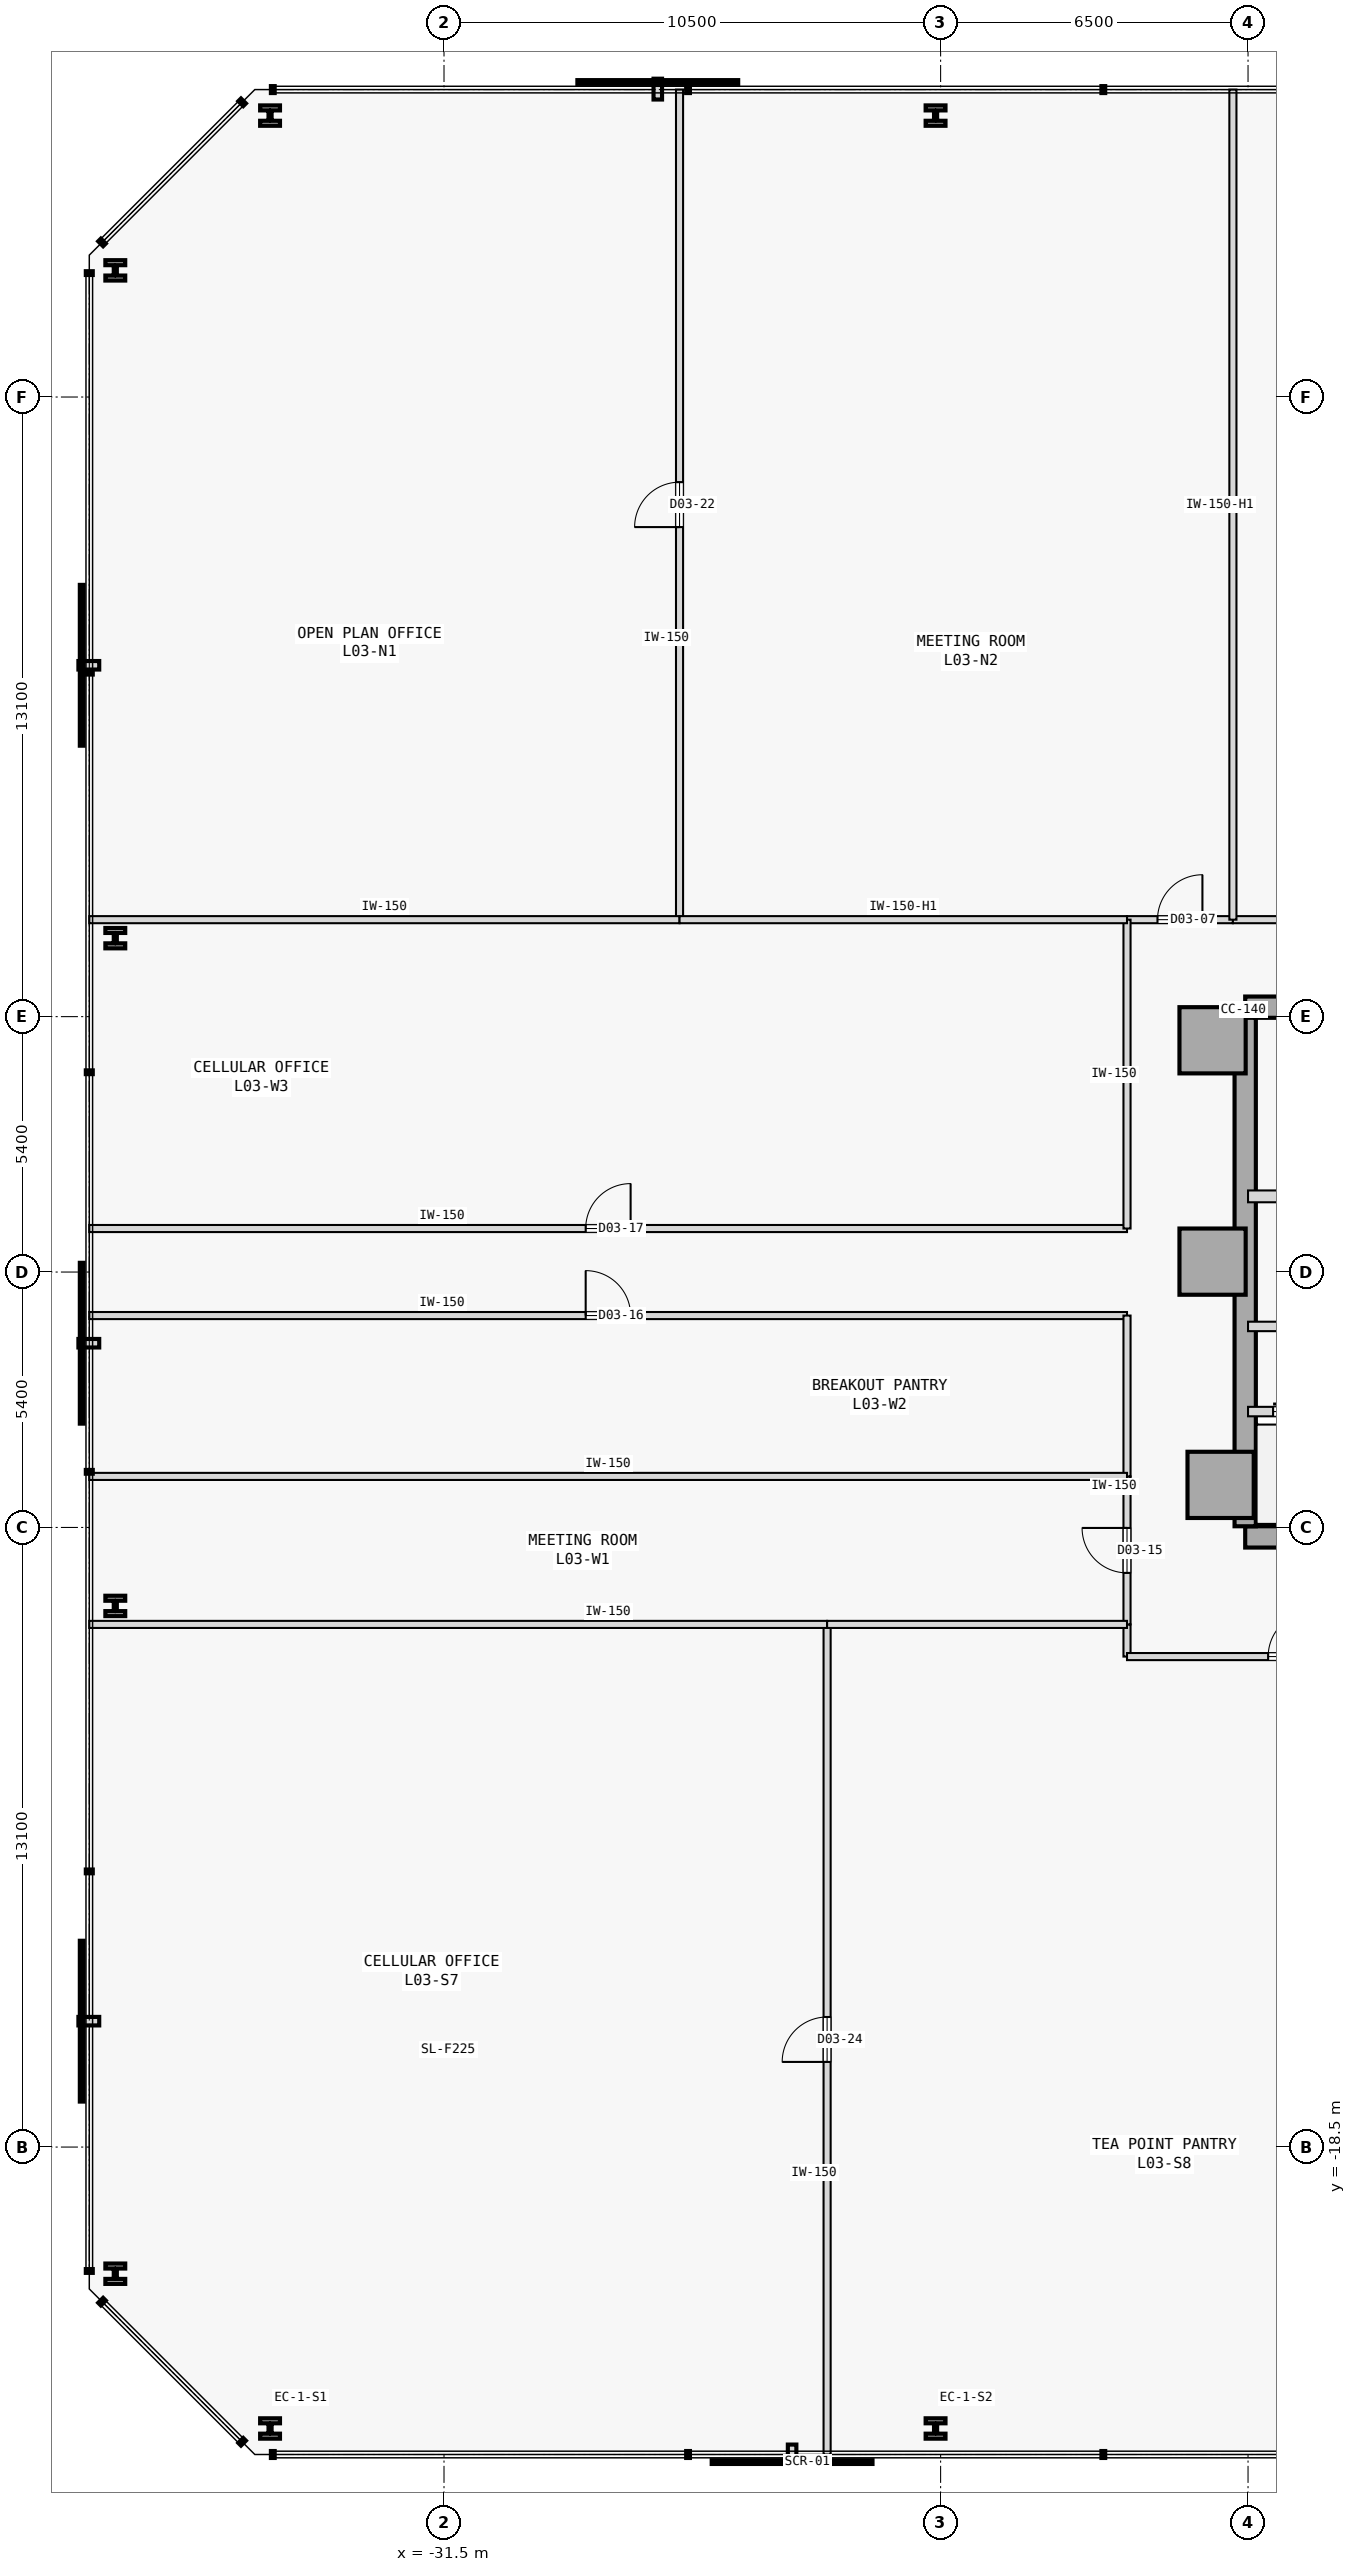
"""IFC4 building model, lengths in metres.
Left out: names, types, materials, properties, quantities, classifications, styles, units other than length and angle.
Written with IfcOpenShell. Run it as: python <this file> out.ifc"""

import sys

from ifc_helpers import new_model, si_unit, direction, frame, frame_2d, origin, origin_2d, place, context, subcontext, project, spatial, rectangle, i_section, extrude, element, fill, save


model = new_model("IFC4")
c1 = context("Model", 3, precision=1e-05, world=origin(), true_north=direction((0.0, 1.0)))
c2 = subcontext(c1, "Body", "Model", "MODEL_VIEW")
j1 = project(units=[si_unit("LENGTHUNIT", "METRE"), si_unit("PLANEANGLEUNIT", "RADIAN")], contexts=[c1])
p1 = place(None, origin())
s1 = spatial("IfcSite", under=j1, at=p1, CompositionType="ELEMENT")
p2 = place(p1, origin())
s2 = spatial("IfcBuilding", under=s1, at=p2, CompositionType="ELEMENT")
p3 = place(p2, frame((0.0, 0.0, 18.0)))
s3 = spatial("IfcBuildingStorey", under=s2, at=p3, CompositionType="ELEMENT", Elevation=18.0)
for number, where, z_axis, x_axis in (
    (1, (-15.25, 4.9, 0.0), (0.0, 0.0, 1.0), (1.0, 0.0, 0.0)),
    (2, (-15.25, 0.22, 0.0), (0.0, 0.0, 1.0), (1.0, 0.0, 0.0)),
    (3, (-15.08, -4.5, 0.0), (0.0, 0.0, 1.0), (1.0, 0.0, 0.0)),
):
    element("IfcColumn", number, at=place(p3, frame(where, z_axis=z_axis, x_axis=x_axis)), inside=s3, PredefinedType="COLUMN", context=c2, shape_type="SweptSolid", body=[
        extrude(rectangle(XDim=1.4, YDim=1.4, at=origin_2d()), origin(), (0.0, 0.0, 1.0), 3.8),
    ])
p4 = place(p3, frame((-14.56, 5.6, 0.0), z_axis=(0.0, 0.0, 1.0), x_axis=(1.0, 0.0, 0.0)))
e4 = element("IfcWall", 4, at=p4, inside=s3, PredefinedType="SHEAR", context=c2, shape_type="SweptSolid", body=[
    extrude(rectangle(XDim=11.41, YDim=0.45, at=frame_2d((5.705, 0.0))), origin(), (0.0, 0.0, 1.0), 3.575),
])
p5 = place(p3, frame((-14.56, -5.6, 0.0), z_axis=(0.0, 0.0, 1.0), x_axis=(1.0, 0.0, 0.0)))
e5 = element("IfcWall", 5, at=p5, inside=s3, PredefinedType="SHEAR", context=c2, shape_type="SweptSolid", body=[
    extrude(rectangle(XDim=10.86, YDim=0.45, at=frame_2d((5.43, 0.0))), origin(), (0.0, 0.0, 1.0), 3.575),
])
p6 = place(p3, frame((-14.56, -5.375, 0.0), z_axis=(0.0, 0.0, 1.0), x_axis=(0.0, 1.0, 0.0)))
e6 = element("IfcWall", 6, at=p6, inside=s3, PredefinedType="SHEAR", context=c2, shape_type="SweptSolid", body=[
    extrude(rectangle(XDim=10.75, YDim=0.45, at=frame_2d((5.375, 0.0))), origin(), (0.0, 0.0, 1.0), 3.575),
])
for number, where, z_axis, x_axis in (
    (7, (-35.178, -24.45, 0.0), (0.0, 0.0, 1.0), (1.0, 0.0, 0.0)),
    (8, (-21.107, -24.45, 0.0), (0.0, 0.0, 1.0), (1.0, 0.0, 0.0)),
    (9, (-21.107, 24.45, 0.0), (0.0, 0.0, 1.0), (1.0, 0.0, 0.0)),
    (10, (-35.178, 24.45, 0.0), (0.0, 0.0, 1.0), (1.0, 0.0, 0.0)),
    (11, (-38.45, 21.178, 0.0), (0.0, 0.0, 1.0), (1.0, 0.0, 0.0)),
    (12, (-38.45, 7.059, 0.0), (0.0, 0.0, 1.0), (1.0, 0.0, 0.0)),
    (13, (-38.45, -7.059, 0.0), (0.0, 0.0, 1.0), (1.0, 0.0, 0.0)),
    (14, (-38.45, -21.178, 0.0), (0.0, 0.0, 1.0), (1.0, 0.0, 0.0)),
):
    element("IfcColumn", number, at=place(p3, frame(where, z_axis=z_axis, x_axis=x_axis)), inside=s3, PredefinedType="COLUMN", context=c2, shape_type="SweptSolid", body=[
        extrude(i_section(OverallWidth=0.42, OverallDepth=0.431, WebThickness=0.065, FlangeThickness=0.106, FilletRadius=0.015, at=origin_2d()), origin(), (0.0, 0.0, 1.0), 3.8),
    ])
p7 = place(p3, frame((-14.5, 1.6, 0.0), z_axis=(0.0, 0.0, 1.0), x_axis=(1.0, 0.0, 0.0)))
e15 = element("IfcWall", 15, at=p7, inside=s3, PredefinedType="STANDARD", context=c2, shape_type="SweptSolid", body=[
    extrude(rectangle(XDim=3.6, YDim=0.25, at=frame_2d((1.8, 0.0))), origin(), (0.0, 0.0, 1.0), 3.575),
])
p8 = place(p7, frame((0.92, 0.0, 0.0)))
e16 = element("IfcOpeningElement", 16, at=p8, cuts=e15, PredefinedType="OPENING", context=c2, shape_type="SweptSolid", body=[
    extrude(rectangle(XDim=1.05, YDim=2.15, at=frame_2d((0.525, 1.075))), frame((0.0, 0.135, 0.0), z_axis=(0.0, -1.0, 0.0), x_axis=(1.0, 0.0, 0.0)), (0.0, 0.0, 1.0), 0.27),
])
p9 = place(p3, frame((-14.5, -1.15, 0.0), z_axis=(0.0, 0.0, 1.0), x_axis=(1.0, 0.0, 0.0)))
e17 = element("IfcWall", 17, at=p9, inside=s3, PredefinedType="STANDARD", context=c2, shape_type="SweptSolid", body=[
    extrude(rectangle(XDim=2.95, YDim=0.2, at=frame_2d((1.475, 0.0))), origin(), (0.0, 0.0, 1.0), 3.575),
])
p10 = place(p9, frame((0.75, 0.0, 0.0)))
e18 = element("IfcOpeningElement", 18, at=p10, cuts=e17, PredefinedType="OPENING", context=c2, shape_type="SweptSolid", body=[
    extrude(rectangle(XDim=1.05, YDim=2.18, at=frame_2d((0.525, 1.09))), frame((0.0, 0.11, 0.0), z_axis=(0.0, -1.0, 0.0), x_axis=(1.0, 0.0, 0.0)), (0.0, 0.0, 1.0), 0.22),
])
p11 = place(p3, frame((-14.5, -2.95, 0.0), z_axis=(0.0, 0.0, 1.0), x_axis=(1.0, 0.0, 0.0)))
e19 = element("IfcWall", 19, at=p11, inside=s3, PredefinedType="STANDARD", context=c2, shape_type="SweptSolid", body=[
    extrude(rectangle(XDim=10.8, YDim=0.2, at=frame_2d((5.4, 0.0))), origin(), (0.0, 0.0, 1.0), 3.575),
])
p12 = place(p11, frame((0.53, 0.0, 0.0)))
e20 = element("IfcOpeningElement", 20, at=p12, cuts=e19, PredefinedType="OPENING", context=c2, shape_type="SweptSolid", body=[
    extrude(rectangle(XDim=1.1, YDim=2.15, at=frame_2d((0.55, 1.075))), frame((0.0, 0.11, 0.0), z_axis=(0.0, -1.0, 0.0), x_axis=(1.0, 0.0, 0.0)), (0.0, 0.0, 1.0), 0.22),
])
p13 = place(p11, frame((2.69, 0.0, 0.0)))
e21 = element("IfcOpeningElement", 21, at=p13, cuts=e19, PredefinedType="OPENING", context=c2, shape_type="SweptSolid", body=[
    extrude(rectangle(XDim=1.1, YDim=2.15, at=frame_2d((0.55, 1.075))), frame((0.0, 0.11, 0.0), z_axis=(0.0, -1.0, 0.0), x_axis=(1.0, 0.0, 0.0)), (0.0, 0.0, 1.0), 0.22),
])
p14 = place(p3, frame((-17.059, 7.45, 0.0), z_axis=(0.0, 0.0, 1.0), x_axis=(1.0, 0.0, 0.0)))
e22 = element("IfcWall", 22, at=p14, inside=s3, PredefinedType="PARTITIONING", context=c2, shape_type="SweptSolid", body=[
    extrude(rectangle(XDim=2.239, YDim=0.15, at=frame_2d((1.12, 0.0))), origin(), (0.0, 0.0, 1.0), 3.575),
])
p15 = place(p14, frame((0.645, 0.0, 0.0)))
e23 = element("IfcOpeningElement", 23, at=p15, cuts=e22, PredefinedType="OPENING", context=c2, shape_type="SweptSolid", body=[
    extrude(rectangle(XDim=0.95, YDim=2.15, at=frame_2d((0.475, 1.075))), frame((0.0, 0.085, 0.0), z_axis=(0.0, -1.0, 0.0), x_axis=(1.0, 0.0, 0.0)), (0.0, 0.0, 1.0), 0.17),
])
p16 = place(p3, frame((-14.82, 7.45, 0.0), z_axis=(0.0, 0.0, 1.0), x_axis=(1.0, 0.0, 0.0)))
e24 = element("IfcWall", 24, at=p16, inside=s3, PredefinedType="PARTITIONING", context=c2, shape_type="SweptSolid", body=[
    extrude(rectangle(XDim=13.9, YDim=0.15, at=frame_2d((6.95, 0.0))), origin(), (0.0, 0.0, 1.0), 3.575),
])
p17 = place(p3, frame((-17.059, -8.13, 0.0), z_axis=(0.0, 0.0, 1.0), x_axis=(0.0, 1.0, 0.0)))
e25 = element("IfcWall", 25, at=p17, inside=s3, PredefinedType="PARTITIONING", context=c2, shape_type="SweptSolid", body=[
    extrude(rectangle(XDim=0.68, YDim=0.15, at=frame_2d((0.34, 0.0))), origin(), (0.0, 0.0, 1.0), 3.575),
])
p18 = place(p3, frame((-17.059, -8.13, 0.0), z_axis=(0.0, 0.0, 1.0), x_axis=(1.0, 0.0, 0.0)))
e26 = element("IfcWall", 26, at=p18, inside=s3, PredefinedType="PARTITIONING", context=c2, shape_type="SweptSolid", body=[
    extrude(rectangle(XDim=6.919, YDim=0.15, at=frame_2d((3.459, 0.0))), origin(), (0.0, 0.0, 1.0), 3.575),
])
p19 = place(p18, frame((2.985, 0.0, 0.0)))
e27 = element("IfcOpeningElement", 27, at=p19, cuts=e26, PredefinedType="OPENING", context=c2, shape_type="SweptSolid", body=[
    extrude(rectangle(XDim=0.95, YDim=2.15, at=frame_2d((0.475, 1.075))), frame((0.0, 0.085, 0.0), z_axis=(0.0, -1.0, 0.0), x_axis=(1.0, 0.0, 0.0)), (0.0, 0.0, 1.0), 0.17),
])
p20 = place(p3, frame((-17.059, -7.45, 0.0), z_axis=(0.0, 0.0, 1.0), x_axis=(0.0, 1.0, 0.0)))
e28 = element("IfcWall", 28, at=p20, inside=s3, PredefinedType="PARTITIONING", context=c2, shape_type="SweptSolid", body=[
    extrude(rectangle(XDim=3.129, YDim=0.15, at=frame_2d((1.564, 0.0))), origin(), (0.0, 0.0, 1.0), 3.575),
])
p21 = place(p20, frame((1.09, 0.0, 0.0)))
e29 = element("IfcOpeningElement", 29, at=p21, cuts=e28, PredefinedType="OPENING", context=c2, shape_type="SweptSolid", body=[
    extrude(rectangle(XDim=0.95, YDim=2.15, at=frame_2d((0.475, 1.075))), frame((0.0, 0.085, 0.0), z_axis=(0.0, -1.0, 0.0), x_axis=(1.0, 0.0, 0.0)), (0.0, 0.0, 1.0), 0.17),
])
p22 = place(p3, frame((-39.0, -0.92, 0.0), z_axis=(0.0, 0.0, 1.0), x_axis=(1.0, 0.0, 0.0)))
e30 = element("IfcWall", 30, at=p22, inside=s3, PredefinedType="PARTITIONING", context=c2, shape_type="SweptSolid", body=[
    extrude(rectangle(XDim=21.941, YDim=0.15, at=frame_2d((10.97, 0.0))), origin(), (0.0, 0.0, 1.0), 3.575),
])
p23 = place(p22, frame((10.496, 0.0, 0.0)))
e31 = element("IfcOpeningElement", 31, at=p23, cuts=e30, PredefinedType="OPENING", context=c2, shape_type="SweptSolid", body=[
    extrude(rectangle(XDim=0.95, YDim=2.15, at=frame_2d((0.475, 1.075))), frame((0.0, 0.085, 0.0), z_axis=(0.0, -1.0, 0.0), x_axis=(1.0, 0.0, 0.0)), (0.0, 0.0, 1.0), 0.17),
])
p24 = place(p3, frame((-17.059, -4.321, 0.0), z_axis=(0.0, 0.0, 1.0), x_axis=(0.0, 1.0, 0.0)))
e32 = element("IfcWall", 32, at=p24, inside=s3, PredefinedType="PARTITIONING", context=c2, shape_type="SweptSolid", body=[
    extrude(rectangle(XDim=3.401, YDim=0.15, at=frame_2d((1.701, 0.0))), origin(), (0.0, 0.0, 1.0), 3.575),
])
p25 = place(p3, frame((-39.0, 0.92, 0.0), z_axis=(0.0, 0.0, 1.0), x_axis=(1.0, 0.0, 0.0)))
e33 = element("IfcWall", 33, at=p25, inside=s3, PredefinedType="PARTITIONING", context=c2, shape_type="SweptSolid", body=[
    extrude(rectangle(XDim=21.941, YDim=0.15, at=frame_2d((10.97, 0.0))), origin(), (0.0, 0.0, 1.0), 3.575),
])
p26 = place(p25, frame((10.496, 0.0, 0.0)))
e34 = element("IfcOpeningElement", 34, at=p26, cuts=e33, PredefinedType="OPENING", context=c2, shape_type="SweptSolid", body=[
    extrude(rectangle(XDim=0.95, YDim=2.15, at=frame_2d((0.475, 1.075))), frame((0.0, 0.085, 0.0), z_axis=(0.0, -1.0, 0.0), x_axis=(1.0, 0.0, 0.0)), (0.0, 0.0, 1.0), 0.17),
])
p27 = place(p3, frame((-17.059, 0.92, 0.0), z_axis=(0.0, 0.0, 1.0), x_axis=(0.0, 1.0, 0.0)))
e35 = element("IfcWall", 35, at=p27, inside=s3, PredefinedType="PARTITIONING", context=c2, shape_type="SweptSolid", body=[
    extrude(rectangle(XDim=6.53, YDim=0.15, at=frame_2d((3.265, 0.0))), origin(), (0.0, 0.0, 1.0), 3.575),
])
p28 = place(p3, frame((-26.52, 7.45, 0.0), z_axis=(0.0, 0.0, 1.0), x_axis=(0.0, 1.0, 0.0)))
e36 = element("IfcWall", 36, at=p28, inside=s3, PredefinedType="PARTITIONING", context=c2, shape_type="SweptSolid", body=[
    extrude(rectangle(XDim=17.55, YDim=0.15, at=frame_2d((8.775, 0.0))), origin(), (0.0, 0.0, 1.0), 3.575),
])
p29 = place(p28, frame((8.3, 0.0, 0.0)))
e37 = element("IfcOpeningElement", 37, at=p29, cuts=e36, PredefinedType="OPENING", context=c2, shape_type="SweptSolid", body=[
    extrude(rectangle(XDim=0.95, YDim=2.15, at=frame_2d((0.475, 1.075))), frame((0.0, 0.085, 0.0), z_axis=(0.0, -1.0, 0.0), x_axis=(1.0, 0.0, 0.0)), (0.0, 0.0, 1.0), 0.17),
])
p30 = place(p3, frame((-39.0, 7.45, 0.0), z_axis=(0.0, 0.0, 1.0), x_axis=(1.0, 0.0, 0.0)))
e38 = element("IfcWall", 38, at=p30, inside=s3, PredefinedType="PARTITIONING", context=c2, shape_type="SweptSolid", body=[
    extrude(rectangle(XDim=12.48, YDim=0.15, at=frame_2d((6.24, 0.0))), origin(), (0.0, 0.0, 1.0), 3.575),
])
p31 = place(p3, frame((-14.82, 7.45, 0.0), z_axis=(0.0, 0.0, 1.0), x_axis=(0.0, 1.0, 0.0)))
e39 = element("IfcWall", 39, at=p31, inside=s3, PredefinedType="PARTITIONING", context=c2, shape_type="SweptSolid", body=[
    extrude(rectangle(XDim=17.55, YDim=0.15, at=frame_2d((8.775, 0.0))), origin(), (0.0, 0.0, 1.0), 3.125),
])
p32 = place(p3, frame((-26.52, 7.45, 0.0), z_axis=(0.0, 0.0, 1.0), x_axis=(1.0, 0.0, 0.0)))
e40 = element("IfcWall", 40, at=p32, inside=s3, PredefinedType="PARTITIONING", context=c2, shape_type="SweptSolid", body=[
    extrude(rectangle(XDim=9.461, YDim=0.15, at=frame_2d((4.73, 0.0))), origin(), (0.0, 0.0, 1.0), 3.125),
])
p33 = place(p3, frame((-23.4, -25.0, 0.0), z_axis=(0.0, 0.0, 1.0), x_axis=(0.0, 1.0, 0.0)))
e41 = element("IfcWall", 41, at=p33, inside=s3, PredefinedType="PARTITIONING", context=c2, shape_type="SweptSolid", body=[
    extrude(rectangle(XDim=17.55, YDim=0.15, at=frame_2d((8.775, 0.0))), origin(), (0.0, 0.0, 1.0), 3.575),
])
p34 = place(p33, frame((8.3, 0.0, 0.0)))
e42 = element("IfcOpeningElement", 42, at=p34, cuts=e41, PredefinedType="OPENING", context=c2, shape_type="SweptSolid", body=[
    extrude(rectangle(XDim=0.95, YDim=2.15, at=frame_2d((0.475, 1.075))), frame((0.0, 0.085, 0.0), z_axis=(0.0, -1.0, 0.0), x_axis=(1.0, 0.0, 0.0)), (0.0, 0.0, 1.0), 0.17),
])
p35 = place(p3, frame((-39.0, -7.45, 0.0), z_axis=(0.0, 0.0, 1.0), x_axis=(1.0, 0.0, 0.0)))
e43 = element("IfcWall", 43, at=p35, inside=s3, PredefinedType="PARTITIONING", context=c2, shape_type="SweptSolid", body=[
    extrude(rectangle(XDim=15.6, YDim=0.15, at=frame_2d((7.8, 0.0))), origin(), (0.0, 0.0, 1.0), 3.575),
])
p36 = place(p3, frame((-23.4, -7.45, 0.0), z_axis=(0.0, 0.0, 1.0), x_axis=(1.0, 0.0, 0.0)))
e44 = element("IfcWall", 44, at=p36, inside=s3, PredefinedType="PARTITIONING", context=c2, shape_type="SweptSolid", body=[
    extrude(rectangle(XDim=6.341, YDim=0.15, at=frame_2d((3.17, 0.0))), origin(), (0.0, 0.0, 1.0), 3.575),
])
p37 = place(p3, frame((-39.0, -4.321, 0.0), z_axis=(0.0, 0.0, 1.0), x_axis=(1.0, 0.0, 0.0)))
e45 = element("IfcWall", 45, at=p37, inside=s3, PredefinedType="PARTITIONING", context=c2, shape_type="SweptSolid", body=[
    extrude(rectangle(XDim=21.941, YDim=0.15, at=frame_2d((10.97, 0.0))), origin(), (0.0, 0.0, 1.0), 3.575),
])
p38 = place(p12, origin())
e46 = element("IfcDoor", 46, at=p38, inside=s3, OperationType="SLIDING_TO_RIGHT", PredefinedType="DOOR", context=c2, shape_type="SweptSolid", body=[
    extrude(rectangle(XDim=1.1, YDim=2.15, at=frame_2d((0.55, 1.075))), frame((0.0, 0.025, 0.0), z_axis=(0.0, -1.0, 0.0), x_axis=(1.0, 0.0, 0.0)), (0.0, 0.0, 1.0), 0.05),
])
fill(e20, e46)
p39 = place(p15, origin())
e47 = element("IfcDoor", 47, at=p39, inside=s3, OperationType="SINGLE_SWING_RIGHT", PredefinedType="DOOR", context=c2, shape_type="SweptSolid", body=[
    extrude(rectangle(XDim=0.95, YDim=2.15, at=frame_2d((0.475, 1.075))), frame((0.0, 0.025, 0.0), z_axis=(0.0, -1.0, 0.0), x_axis=(1.0, 0.0, 0.0)), (0.0, 0.0, 1.0), 0.05),
])
fill(e23, e47)
p40 = place(p19, origin())
e48 = element("IfcDoor", 48, at=p40, inside=s3, OperationType="SINGLE_SWING_RIGHT", PredefinedType="DOOR", context=c2, shape_type="SweptSolid", body=[
    extrude(rectangle(XDim=0.95, YDim=2.15, at=frame_2d((0.475, 1.075))), frame((0.0, 0.025, 0.0), z_axis=(0.0, -1.0, 0.0), x_axis=(1.0, 0.0, 0.0)), (0.0, 0.0, 1.0), 0.05),
])
fill(e27, e48)
p41 = place(p21, origin())
e49 = element("IfcDoor", 49, at=p41, inside=s3, OperationType="SINGLE_SWING_RIGHT", PredefinedType="DOOR", context=c2, shape_type="SweptSolid", body=[
    extrude(rectangle(XDim=0.95, YDim=2.15, at=frame_2d((0.475, 1.075))), frame((0.0, 0.025, 0.0), z_axis=(0.0, -1.0, 0.0), x_axis=(1.0, 0.0, 0.0)), (0.0, 0.0, 1.0), 0.05),
])
fill(e29, e49)
p42 = place(p23, origin())
e50 = element("IfcDoor", 50, at=p42, inside=s3, OperationType="SINGLE_SWING_LEFT", PredefinedType="DOOR", context=c2, shape_type="SweptSolid", body=[
    extrude(rectangle(XDim=0.95, YDim=2.15, at=frame_2d((0.475, 1.075))), frame((0.0, 0.025, 0.0), z_axis=(0.0, -1.0, 0.0), x_axis=(1.0, 0.0, 0.0)), (0.0, 0.0, 1.0), 0.05),
])
fill(e31, e50)
p43 = place(p26, origin())
e51 = element("IfcDoor", 51, at=p43, inside=s3, OperationType="SINGLE_SWING_RIGHT", PredefinedType="DOOR", context=c2, shape_type="SweptSolid", body=[
    extrude(rectangle(XDim=0.95, YDim=2.15, at=frame_2d((0.475, 1.075))), frame((0.0, 0.025, 0.0), z_axis=(0.0, -1.0, 0.0), x_axis=(1.0, 0.0, 0.0)), (0.0, 0.0, 1.0), 0.05),
])
fill(e34, e51)
p44 = place(p29, origin())
e52 = element("IfcDoor", 52, at=p44, inside=s3, OperationType="SINGLE_SWING_LEFT", PredefinedType="DOOR", context=c2, shape_type="SweptSolid", body=[
    extrude(rectangle(XDim=0.95, YDim=2.15, at=frame_2d((0.475, 1.075))), frame((0.0, 0.025, 0.0), z_axis=(0.0, -1.0, 0.0), x_axis=(1.0, 0.0, 0.0)), (0.0, 0.0, 1.0), 0.05),
])
fill(e37, e52)
p45 = place(p34, origin())
e53 = element("IfcDoor", 53, at=p45, inside=s3, OperationType="SINGLE_SWING_LEFT", PredefinedType="DOOR", context=c2, shape_type="SweptSolid", body=[
    extrude(rectangle(XDim=0.95, YDim=2.15, at=frame_2d((0.475, 1.075))), frame((0.0, 0.025, 0.0), z_axis=(0.0, -1.0, 0.0), x_axis=(1.0, 0.0, 0.0)), (0.0, 0.0, 1.0), 0.05),
])
fill(e42, e53)
save(model, sys.argv[1])
